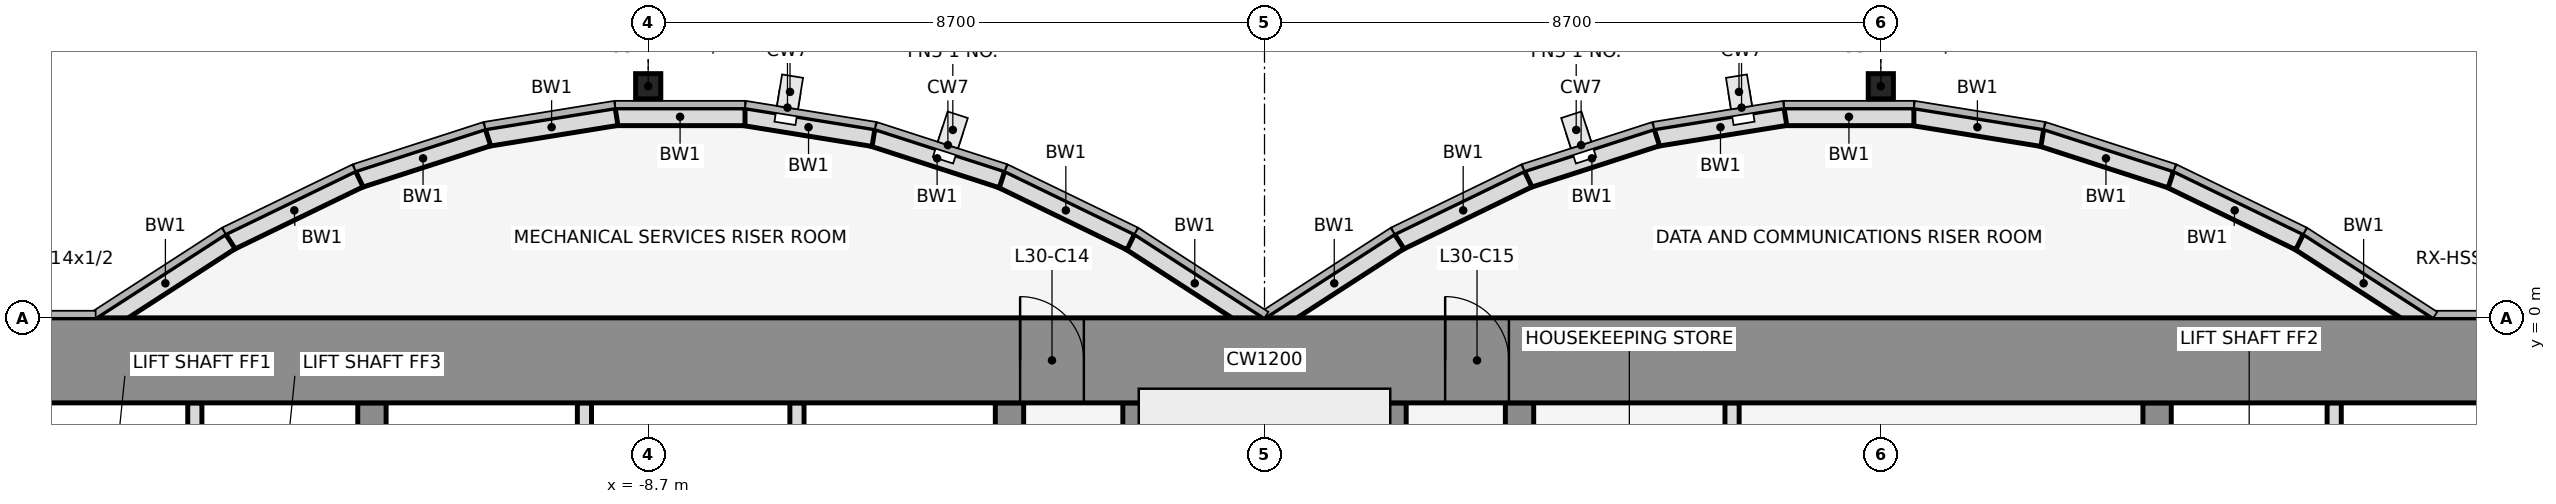
"""IFC4 building model, lengths in metres.
Left out: names, types, materials, properties, quantities, classifications, styles, units other than length and angle.
Written with IfcOpenShell. Run it as: python <this file> out.ifc"""

import sys

from ifc_helpers import new_model, si_unit, direction, frame, frame_2d, origin, origin_2d, place, context, subcontext, project, spatial, rectangle, hollow_rectangle, extrude, element, fill, save


model = new_model("IFC4")
c1 = context("Model", 3, precision=1e-05, world=origin(), true_north=direction((0.0, 1.0)))
c2 = subcontext(c1, "Body", "Model", "MODEL_VIEW")
j1 = project(units=[si_unit("LENGTHUNIT", "METRE"), si_unit("PLANEANGLEUNIT", "RADIAN")], contexts=[c1])
p1 = place(None, origin())
s1 = spatial("IfcSite", under=j1, at=p1, CompositionType="ELEMENT")
p2 = place(p1, origin())
s2 = spatial("IfcBuilding", under=s1, at=p2, CompositionType="ELEMENT")
p3 = place(p2, frame((0.0, 0.0, 140.4)))
s3 = spatial("IfcBuildingStorey", under=s2, at=p3, CompositionType="ELEMENT", Elevation=140.4)
for number, where, z_axis, x_axis in (
    (1, (-8.7, 3.269, 0.0), (0.0, 0.0, 1.0), (1.0, 0.0, 0.0)),
    (2, (8.7, 3.269, 0.0), (0.0, 0.0, 1.0), (1.0, 0.0, 0.0)),
):
    element("IfcColumn", number, at=place(p3, frame(where, z_axis=z_axis, x_axis=x_axis)), inside=s3, PredefinedType="COLUMN", context=c2, shape_type="SweptSolid", body=[
        extrude(hollow_rectangle(XDim=0.356, YDim=0.356, WallThickness=0.012, at=origin_2d()), origin(), (0.0, 0.0, 1.0), 4.1),
    ])
p4 = place(p3, frame((16.432, -0.105, 0.0), z_axis=(0.0, 0.0, 1.0), x_axis=(-0.83981312244, 0.542875602121, 0.0)))
e3 = element("IfcWall", 3, at=p4, inside=s3, PredefinedType="STANDARD", context=c2, shape_type="SweptSolid", body=[
    extrude(rectangle(XDim=2.183, YDim=0.25, at=frame_2d((1.091, 0.0))), origin(), (0.0, 0.0, 1.0), 3.95),
])
p5 = place(p3, frame((14.612, 1.073, 0.0), z_axis=(0.0, 0.0, 1.0), x_axis=(-0.89982408427, 0.436252928206, 0.0)))
e4 = element("IfcWall", 4, at=p5, inside=s3, PredefinedType="STANDARD", context=c2, shape_type="SweptSolid", body=[
    extrude(rectangle(XDim=2.038, YDim=0.25, at=frame_2d((1.019, 0.0))), origin(), (0.0, 0.0, 1.0), 3.95),
])
p6 = place(p3, frame((12.795, 1.955, 0.0), z_axis=(0.0, 0.0, 1.0), x_axis=(-0.951495806175, 0.307661714928, 0.0)))
e5 = element("IfcWall", 5, at=p6, inside=s3, PredefinedType="STANDARD", context=c2, shape_type="SweptSolid", body=[
    extrude(rectangle(XDim=1.927, YDim=0.25, at=frame_2d((0.963, 0.0))), origin(), (0.0, 0.0, 1.0), 3.95),
])
p7 = place(p3, frame((10.98, 2.543, 0.0), z_axis=(0.0, 0.0, 1.0), x_axis=(-0.987181718931, 0.159600293885, 0.0)))
e6 = element("IfcWall", 6, at=p7, inside=s3, PredefinedType="STANDARD", context=c2, shape_type="SweptSolid", body=[
    extrude(rectangle(XDim=1.857, YDim=0.25, at=frame_2d((0.929, 0.0))), origin(), (0.0, 0.0, 1.0), 3.95),
])
p8 = place(p3, frame((9.167, 2.838, 0.0), z_axis=(0.0, 0.0, 1.0), x_axis=(-1.0, 0.0, 0.0)))
e7 = element("IfcWall", 7, at=p8, inside=s3, PredefinedType="STANDARD", context=c2, shape_type="SweptSolid", body=[
    extrude(rectangle(XDim=1.833, YDim=0.25, at=frame_2d((0.917, 0.0))), origin(), (0.0, 0.0, 1.0), 3.95),
])
p9 = place(p3, frame((7.353, 2.84, 0.0), z_axis=(0.0, 0.0, 1.0), x_axis=(-0.987181718931, -0.159600293885, 0.0)))
e8 = element("IfcWall", 8, at=p9, inside=s3, PredefinedType="STANDARD", context=c2, shape_type="SweptSolid", body=[
    extrude(rectangle(XDim=1.857, YDim=0.25, at=frame_2d((0.929, 0.0))), origin(), (0.0, 0.0, 1.0), 3.95),
])
p10 = place(p3, frame((5.538, 2.548, 0.0), z_axis=(0.0, 0.0, 1.0), x_axis=(-0.951495806175, -0.307661714928, 0.0)))
e9 = element("IfcWall", 9, at=p10, inside=s3, PredefinedType="STANDARD", context=c2, shape_type="SweptSolid", body=[
    extrude(rectangle(XDim=1.927, YDim=0.25, at=frame_2d((0.963, 0.0))), origin(), (0.0, 0.0, 1.0), 3.95),
])
p11 = place(p3, frame((3.721, 1.962, 0.0), z_axis=(0.0, 0.0, 1.0), x_axis=(-0.89982408427, -0.436252928206, 0.0)))
e10 = element("IfcWall", 10, at=p11, inside=s3, PredefinedType="STANDARD", context=c2, shape_type="SweptSolid", body=[
    extrude(rectangle(XDim=2.038, YDim=0.25, at=frame_2d((1.019, 0.0))), origin(), (0.0, 0.0, 1.0), 3.95),
])
for number, where, z_axis, x_axis in (
    (11, (1.901, 1.08, 0.0), (0.0, 0.0, 1.0), (-0.84, -0.543, 0.0)),
    (12, (-0.068, -0.105, 0.0), (0.0, 0.0, 1.0), (-0.84, 0.543, 0.0)),
):
    element("IfcWall", number, at=place(p3, frame(where, z_axis=z_axis, x_axis=x_axis)), inside=s3, PredefinedType="STANDARD", context=c2, shape_type="SweptSolid", body=[
        extrude(rectangle(XDim=2.183, YDim=0.25, at=frame_2d((1.091, 0.0))), origin(), (0.0, 0.0, 1.0), 3.95),
    ])
p12 = place(p3, frame((-1.888, 1.073, 0.0), z_axis=(0.0, 0.0, 1.0), x_axis=(-0.89982408427, 0.436252928206, 0.0)))
e13 = element("IfcWall", 13, at=p12, inside=s3, PredefinedType="STANDARD", context=c2, shape_type="SweptSolid", body=[
    extrude(rectangle(XDim=2.038, YDim=0.25, at=frame_2d((1.019, 0.0))), origin(), (0.0, 0.0, 1.0), 3.95),
])
p13 = place(p3, frame((-3.705, 1.955, 0.0), z_axis=(0.0, 0.0, 1.0), x_axis=(-0.951495806175, 0.307661714928, 0.0)))
e14 = element("IfcWall", 14, at=p13, inside=s3, PredefinedType="STANDARD", context=c2, shape_type="SweptSolid", body=[
    extrude(rectangle(XDim=1.927, YDim=0.25, at=frame_2d((0.963, 0.0))), origin(), (0.0, 0.0, 1.0), 3.95),
])
p14 = place(p3, frame((-5.52, 2.543, 0.0), z_axis=(0.0, 0.0, 1.0), x_axis=(-0.987181718931, 0.159600293885, 0.0)))
e15 = element("IfcWall", 15, at=p14, inside=s3, PredefinedType="STANDARD", context=c2, shape_type="SweptSolid", body=[
    extrude(rectangle(XDim=1.857, YDim=0.25, at=frame_2d((0.929, 0.0))), origin(), (0.0, 0.0, 1.0), 3.95),
])
p15 = place(p3, frame((-7.333, 2.838, 0.0), z_axis=(0.0, 0.0, 1.0), x_axis=(-1.0, 0.0, 0.0)))
e16 = element("IfcWall", 16, at=p15, inside=s3, PredefinedType="STANDARD", context=c2, shape_type="SweptSolid", body=[
    extrude(rectangle(XDim=1.833, YDim=0.25, at=frame_2d((0.917, 0.0))), origin(), (0.0, 0.0, 1.0), 3.95),
])
p16 = place(p3, frame((-9.147, 2.84, 0.0), z_axis=(0.0, 0.0, 1.0), x_axis=(-0.987181718931, -0.159600293885, 0.0)))
e17 = element("IfcWall", 17, at=p16, inside=s3, PredefinedType="STANDARD", context=c2, shape_type="SweptSolid", body=[
    extrude(rectangle(XDim=1.857, YDim=0.25, at=frame_2d((0.929, 0.0))), origin(), (0.0, 0.0, 1.0), 3.95),
])
p17 = place(p3, frame((-10.962, 2.548, 0.0), z_axis=(0.0, 0.0, 1.0), x_axis=(-0.951495806175, -0.307661714928, 0.0)))
e18 = element("IfcWall", 18, at=p17, inside=s3, PredefinedType="STANDARD", context=c2, shape_type="SweptSolid", body=[
    extrude(rectangle(XDim=1.927, YDim=0.25, at=frame_2d((0.963, 0.0))), origin(), (0.0, 0.0, 1.0), 3.95),
])
p18 = place(p3, frame((-12.779, 1.962, 0.0), z_axis=(0.0, 0.0, 1.0), x_axis=(-0.89982408427, -0.436252928206, 0.0)))
e19 = element("IfcWall", 19, at=p18, inside=s3, PredefinedType="STANDARD", context=c2, shape_type="SweptSolid", body=[
    extrude(rectangle(XDim=2.038, YDim=0.25, at=frame_2d((1.019, 0.0))), origin(), (0.0, 0.0, 1.0), 3.95),
])
p19 = place(p3, frame((-14.599, 1.08, 0.0), z_axis=(0.0, 0.0, 1.0), x_axis=(-0.83981312244, -0.542875602121, 0.0)))
e20 = element("IfcWall", 20, at=p19, inside=s3, PredefinedType="STANDARD", context=c2, shape_type="SweptSolid", body=[
    extrude(rectangle(XDim=2.183, YDim=0.25, at=frame_2d((1.091, 0.0))), origin(), (0.0, 0.0, 1.0), 3.95),
])
p20 = place(p3, frame((-15.1, -4.6, 0.0), z_axis=(0.0, 0.0, 1.0), x_axis=(0.0, 1.0, 0.0)))
e21 = element("IfcWall", 21, at=p20, inside=s3, PredefinedType="PARTITIONING", context=c2, shape_type="SweptSolid", body=[
    extrude(rectangle(XDim=3.4, YDim=0.2, at=frame_2d((1.7, 0.0))), origin(), (0.0, 0.0, 1.0), 2.939),
])
p21 = place(p3, frame((-12.6, -11.8, 0.0), z_axis=(0.0, 0.0, 1.0), x_axis=(0.0, 1.0, 0.0)))
e22 = element("IfcWall", 22, at=p21, inside=s3, PredefinedType="SHEAR", context=c2, shape_type="SweptSolid", body=[
    extrude(rectangle(XDim=10.6, YDim=0.4, at=frame_2d((5.3, 0.0))), origin(), (0.0, 0.0, 1.0), 4.1),
])
p22 = place(p21, frame((4.75, 0.0, 0.0)))
e23 = element("IfcOpeningElement", 23, at=p22, cuts=e22, PredefinedType="OPENING", context=c2, shape_type="SweptSolid", body=[
    extrude(rectangle(XDim=1.1, YDim=2.1, at=frame_2d((0.55, 1.05))), frame((0.0, 0.212, 0.0), z_axis=(0.0, -1.0, 0.0), x_axis=(1.0, 0.0, 0.0)), (0.0, 0.0, 1.0), 0.424),
])
for number, where, z_axis, x_axis in (
    (24, (-9.6, -4.6, 0.0), (0.0, 0.0, 1.0), (0.0, 1.0, 0.0)),
    (25, (-6.6, -4.6, 0.0), (0.0, 0.0, 1.0), (0.0, 1.0, 0.0)),
):
    element("IfcWall", number, at=place(p3, frame(where, z_axis=z_axis, x_axis=x_axis)), inside=s3, PredefinedType="PARTITIONING", context=c2, shape_type="SweptSolid", body=[
        extrude(rectangle(XDim=3.4, YDim=0.2, at=frame_2d((1.7, 0.0))), origin(), (0.0, 0.0, 1.0), 2.939),
    ])
p23 = place(p3, frame((-3.6, -11.8, 0.0), z_axis=(0.0, 0.0, 1.0), x_axis=(0.0, 1.0, 0.0)))
e26 = element("IfcWall", 26, at=p23, inside=s3, PredefinedType="SHEAR", context=c2, shape_type="SweptSolid", body=[
    extrude(rectangle(XDim=10.6, YDim=0.4, at=frame_2d((5.3, 0.0))), origin(), (0.0, 0.0, 1.0), 4.1),
])
p24 = place(p23, frame((4.85, 0.0, 0.0)))
e27 = element("IfcOpeningElement", 27, at=p24, cuts=e26, PredefinedType="OPENING", context=c2, shape_type="SweptSolid", body=[
    extrude(rectangle(XDim=0.9, YDim=2.1, at=frame_2d((0.45, 1.05))), frame((0.0, 0.212, 0.0), z_axis=(0.0, -1.0, 0.0), x_axis=(1.0, 0.0, 0.0)), (0.0, 0.0, 1.0), 0.424),
])
for number, where, z_axis, x_axis in (
    (28, (-1.8, -11.8, 0.0), (0.0, 0.0, 1.0), (0.0, 1.0, 0.0)),
    (29, (1.8, -11.8, 0.0), (0.0, 0.0, 1.0), (0.0, 1.0, 0.0)),
):
    element("IfcWall", number, at=place(p3, frame(where, z_axis=z_axis, x_axis=x_axis)), inside=s3, PredefinedType="SHEAR", context=c2, shape_type="SweptSolid", body=[
        extrude(rectangle(XDim=10.6, YDim=0.4, at=frame_2d((5.3, 0.0))), origin(), (0.0, 0.0, 1.0), 4.1),
    ])
p25 = place(p3, frame((3.6, -11.8, 0.0), z_axis=(0.0, 0.0, 1.0), x_axis=(0.0, 1.0, 0.0)))
e30 = element("IfcWall", 30, at=p25, inside=s3, PredefinedType="SHEAR", context=c2, shape_type="SweptSolid", body=[
    extrude(rectangle(XDim=10.6, YDim=0.4, at=frame_2d((5.3, 0.0))), origin(), (0.0, 0.0, 1.0), 4.1),
])
p26 = place(p25, frame((1.35, 0.0, 0.0)))
e31 = element("IfcOpeningElement", 31, at=p26, cuts=e30, PredefinedType="OPENING", context=c2, shape_type="SweptSolid", body=[
    extrude(rectangle(XDim=0.9, YDim=2.1, at=frame_2d((0.45, 1.05))), frame((0.0, 0.212, 0.0), z_axis=(0.0, -1.0, 0.0), x_axis=(1.0, 0.0, 0.0)), (0.0, 0.0, 1.0), 0.424),
])
p27 = place(p3, frame((6.6, -4.6, 0.0), z_axis=(0.0, 0.0, 1.0), x_axis=(0.0, 1.0, 0.0)))
e32 = element("IfcWall", 32, at=p27, inside=s3, PredefinedType="PARTITIONING", context=c2, shape_type="SweptSolid", body=[
    extrude(rectangle(XDim=3.4, YDim=0.2, at=frame_2d((1.7, 0.0))), origin(), (0.0, 0.0, 1.0), 2.939),
])
p28 = place(p3, frame((12.6, -11.8, 0.0), z_axis=(0.0, 0.0, 1.0), x_axis=(0.0, 1.0, 0.0)))
e33 = element("IfcWall", 33, at=p28, inside=s3, PredefinedType="SHEAR", context=c2, shape_type="SweptSolid", body=[
    extrude(rectangle(XDim=10.6, YDim=0.4, at=frame_2d((5.3, 0.0))), origin(), (0.0, 0.0, 1.0), 4.1),
])
p29 = place(p28, frame((1.25, 0.0, 0.0)))
e34 = element("IfcOpeningElement", 34, at=p29, cuts=e33, PredefinedType="OPENING", context=c2, shape_type="SweptSolid", body=[
    extrude(rectangle(XDim=1.2, YDim=2.1, at=frame_2d((0.6, 1.05))), frame((0.0, 0.212, 0.0), z_axis=(0.0, -1.0, 0.0), x_axis=(1.0, 0.0, 0.0)), (0.0, 0.0, 1.0), 0.424),
])
p30 = place(p28, frame((4.75, 0.0, 0.0)))
e35 = element("IfcOpeningElement", 35, at=p30, cuts=e33, PredefinedType="OPENING", context=c2, shape_type="SweptSolid", body=[
    extrude(rectangle(XDim=1.1, YDim=2.1, at=frame_2d((0.55, 1.05))), frame((0.0, 0.212, 0.0), z_axis=(0.0, -1.0, 0.0), x_axis=(1.0, 0.0, 0.0)), (0.0, 0.0, 1.0), 0.424),
])
p31 = place(p3, frame((15.1, -4.6, 0.0), z_axis=(0.0, 0.0, 1.0), x_axis=(0.0, 1.0, 0.0)))
e36 = element("IfcWall", 36, at=p31, inside=s3, PredefinedType="PARTITIONING", context=c2, shape_type="SweptSolid", body=[
    extrude(rectangle(XDim=3.4, YDim=0.2, at=frame_2d((1.7, 0.0))), origin(), (0.0, 0.0, 1.0), 2.939),
])
p32 = place(p3, frame((-22.0, -0.6, 0.0), z_axis=(0.0, 0.0, 1.0), x_axis=(1.0, 0.0, 0.0)))
e37 = element("IfcWall", 37, at=p32, inside=s3, PredefinedType="SHEAR", context=c2, shape_type="SweptSolid", body=[
    extrude(rectangle(XDim=44.0, YDim=1.2, at=frame_2d((22.0, 0.0))), origin(), (0.0, 0.0, 1.0), 4.1),
])
p33 = place(p32, frame((18.55, 0.0, 0.0)))
e38 = element("IfcOpeningElement", 38, at=p33, cuts=e37, PredefinedType="OPENING", context=c2, shape_type="SweptSolid", body=[
    extrude(rectangle(XDim=0.9, YDim=2.1, at=frame_2d((0.45, 1.05))), frame((0.0, 0.612, 0.0), z_axis=(0.0, -1.0, 0.0), x_axis=(1.0, 0.0, 0.0)), (0.0, 0.0, 1.0), 1.224),
])
p34 = place(p32, frame((24.55, 0.0, 0.0)))
e39 = element("IfcOpeningElement", 39, at=p34, cuts=e37, PredefinedType="OPENING", context=c2, shape_type="SweptSolid", body=[
    extrude(rectangle(XDim=0.9, YDim=2.1, at=frame_2d((0.45, 1.05))), frame((0.0, 0.612, 0.0), z_axis=(0.0, -1.0, 0.0), x_axis=(1.0, 0.0, 0.0)), (0.0, 0.0, 1.0), 1.224),
])
p35 = place(p33, origin())
e40 = element("IfcDoor", 40, at=p35, inside=s3, OperationType="SINGLE_SWING_LEFT", PredefinedType="DOOR", context=c2, shape_type="SweptSolid", body=[
    extrude(rectangle(XDim=0.9, YDim=2.1, at=frame_2d((0.45, 1.05))), frame((0.0, 0.025, 0.0), z_axis=(0.0, -1.0, 0.0), x_axis=(1.0, 0.0, 0.0)), (0.0, 0.0, 1.0), 0.05),
])
fill(e38, e40)
p36 = place(p34, origin())
e41 = element("IfcDoor", 41, at=p36, inside=s3, OperationType="SINGLE_SWING_LEFT", PredefinedType="DOOR", context=c2, shape_type="SweptSolid", body=[
    extrude(rectangle(XDim=0.9, YDim=2.1, at=frame_2d((0.45, 1.05))), frame((0.0, 0.025, 0.0), z_axis=(0.0, -1.0, 0.0), x_axis=(1.0, 0.0, 0.0)), (0.0, 0.0, 1.0), 0.05),
])
fill(e39, e41)
save(model, sys.argv[1])
